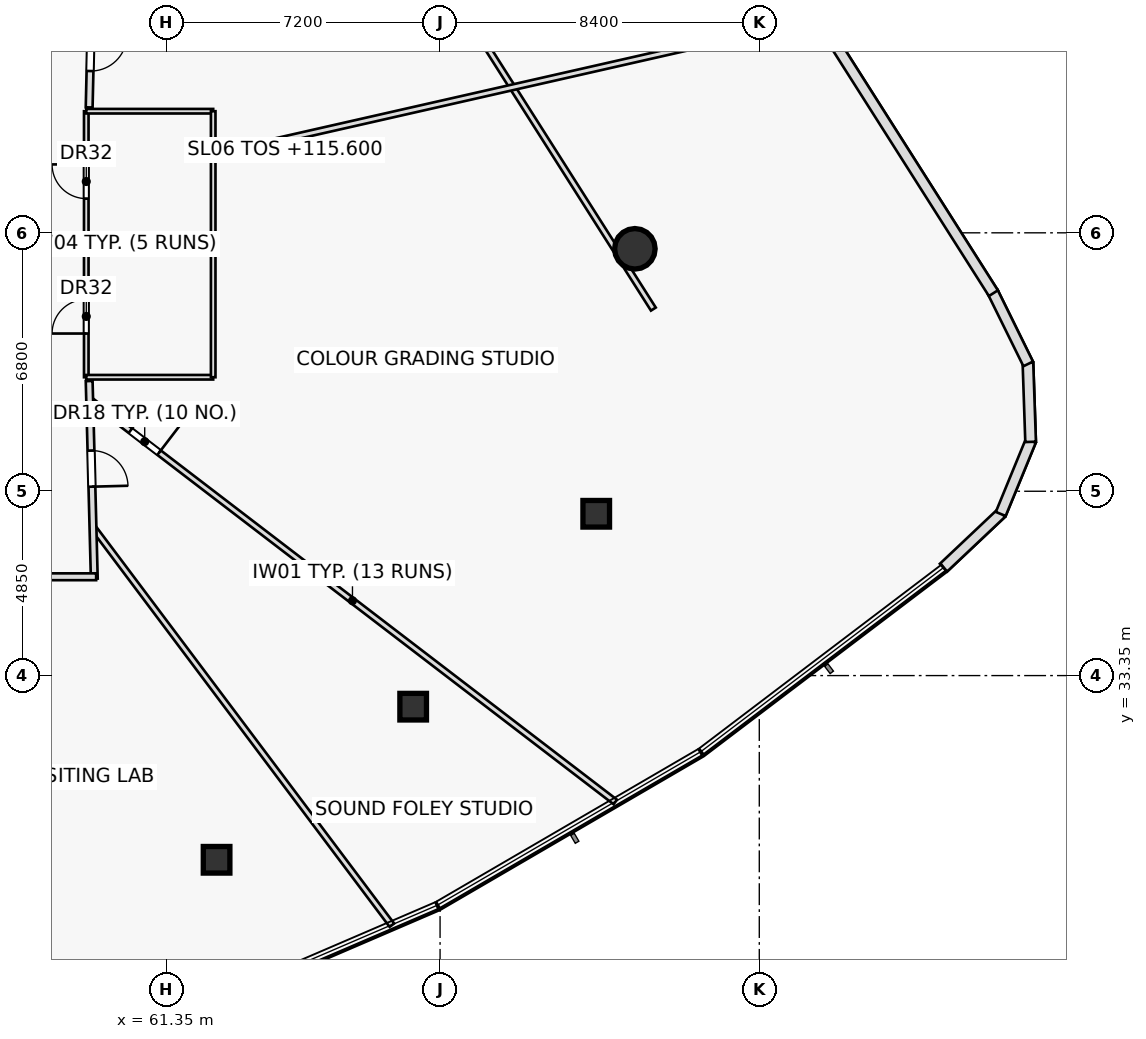
"""IFC4 building model, lengths in metres.
Left out: names, types, materials, properties, quantities, classifications, styles, units other than length and angle.
Written with IfcOpenShell. Run it as: python <this file> out.ifc"""

import sys

from ifc_helpers import new_model, si_unit, direction, frame, frame_2d, origin, origin_2d, place, context, subcontext, project, spatial, rectangle, hollow_rectangle, hollow_circle, extrude, element, fill, save


model = new_model("IFC4")
c1 = context("Model", 3, precision=1e-05, world=origin(), true_north=direction((0.0, 1.0)))
c2 = subcontext(c1, "Body", "Model", "MODEL_VIEW")
j1 = project(units=[si_unit("LENGTHUNIT", "METRE"), si_unit("PLANEANGLEUNIT", "RADIAN")], contexts=[c1])
p1 = place(None, origin())
s1 = spatial("IfcSite", under=j1, at=p1, CompositionType="ELEMENT")
p2 = place(p1, origin())
s2 = spatial("IfcBuilding", under=s1, at=p2, CompositionType="ELEMENT")
p3 = place(p2, frame((0.0, 0.0, 115.6)))
s3 = spatial("IfcBuildingStorey", under=s2, at=p3, CompositionType="ELEMENT", Elevation=115.6)
for number, where, z_axis, x_axis in (
    (1, (62.669, 28.503, 0.0), (0.0, 0.0, 1.0), (1.0, 0.0, 0.0)),
    (2, (67.842, 32.532, 0.0), (0.0, 0.0, 1.0), (1.0, 0.0, 0.0)),
    (3, (72.659, 37.607, 0.0), (0.0, 0.0, 1.0), (1.0, 0.0, 0.0)),
):
    element("IfcColumn", number, at=place(p3, frame(where, z_axis=z_axis, x_axis=x_axis)), inside=s3, PredefinedType="COLUMN", context=c2, shape_type="SweptSolid", body=[
        extrude(hollow_rectangle(XDim=0.7, YDim=0.7, WallThickness=0.04, at=origin_2d()), origin(), (0.0, 0.0, 1.0), 3.55),
    ])
p4 = place(p3, frame((73.676, 44.58, 0.0), z_axis=(0.0, 0.0, 1.0), x_axis=(1.0, 0.0, 0.0)))
e4 = element("IfcColumn", 4, at=p4, inside=s3, PredefinedType="COLUMN", context=c2, shape_type="SweptSolid", body=[
    extrude(hollow_circle(Radius=0.533, WallThickness=0.045, at=origin_2d()), origin(), (0.0, 0.0, 1.0), 3.55),
])
p5 = place(p3, frame((74.163, 42.993, 0.0), z_axis=(0.0, 0.0, 1.0), x_axis=(-0.53628142437, 0.844039237166, 0.0)))
e5 = element("IfcWall", 5, at=p5, inside=s3, PredefinedType="PARTITIONING", context=c2, shape_type="SweptSolid", body=[
    extrude(rectangle(XDim=10.267, YDim=0.15, at=frame_2d((5.133, 0.0))), origin(), (0.0, 0.0, 1.0), 2.835),
])
p6 = place(p3, frame((59.24, 41.2, 0.0), z_axis=(0.0, 0.0, 1.0), x_axis=(0.0, 1.0, 0.0)))
e6 = element("IfcWall", 6, at=p6, inside=s3, PredefinedType="PARTITIONING", context=c2, shape_type="SweptSolid", body=[
    extrude(rectangle(XDim=7.0, YDim=0.12, at=frame_2d((3.5, 0.0))), origin(), (0.0, 0.0, 1.0), 3.55),
])
p7 = place(p6, frame((1.15, 0.0, 0.0)))
e7 = element("IfcOpeningElement", 7, at=p7, cuts=e6, PredefinedType="OPENING", context=c2, shape_type="SweptSolid", body=[
    extrude(rectangle(XDim=0.9, YDim=2.05, at=frame_2d((0.45, 1.025))), frame((0.0, 0.07, 0.0), z_axis=(0.0, -1.0, 0.0), x_axis=(1.0, 0.0, 0.0)), (0.0, 0.0, 1.0), 0.14),
])
p8 = place(p6, frame((4.7, 0.0, 0.0)))
e8 = element("IfcOpeningElement", 8, at=p8, cuts=e6, PredefinedType="OPENING", context=c2, shape_type="SweptSolid", body=[
    extrude(rectangle(XDim=0.9, YDim=2.05, at=frame_2d((0.45, 1.025))), frame((0.0, 0.07, 0.0), z_axis=(0.0, -1.0, 0.0), x_axis=(1.0, 0.0, 0.0)), (0.0, 0.0, 1.0), 0.14),
])
for number, where, z_axis, x_axis in (
    (9, (59.24, 41.2, 0.0), (0.0, 0.0, 1.0), (1.0, 0.0, 0.0)),
    (10, (59.24, 44.65, 0.0), (0.0, 0.0, 1.0), (1.0, 0.0, 0.0)),
    (11, (59.24, 48.2, 0.0), (0.0, 0.0, 1.0), (1.0, 0.0, 0.0)),
):
    element("IfcWall", number, at=place(p3, frame(where, z_axis=z_axis, x_axis=x_axis)), inside=s3, PredefinedType="PARTITIONING", context=c2, shape_type="SweptSolid", body=[
        extrude(rectangle(XDim=3.34, YDim=0.12, at=frame_2d((1.67, 0.0))), origin(), (0.0, 0.0, 1.0), 3.55),
    ])
p9 = place(p3, frame((62.58, 41.2, 0.0), z_axis=(0.0, 0.0, 1.0), x_axis=(0.0, 1.0, 0.0)))
e12 = element("IfcWall", 12, at=p9, inside=s3, PredefinedType="PARTITIONING", context=c2, shape_type="SweptSolid", body=[
    extrude(rectangle(XDim=7.0, YDim=0.12, at=frame_2d((3.5, 0.0))), origin(), (0.0, 0.0, 1.0), 3.55),
])
p10 = place(p3, frame((59.416, 37.256, 0.0), z_axis=(0.0, 0.0, 1.0), x_axis=(0.60052474056, -0.799606175549, 0.0)))
e13 = element("IfcWall", 13, at=p10, inside=s3, PredefinedType="PARTITIONING", context=c2, shape_type="SweptSolid", body=[
    extrude(rectangle(XDim=13.098, YDim=0.15, at=frame_2d((6.549, 0.0))), origin(), (0.0, 0.0, 1.0), 2.835),
])
p11 = place(p3, frame((59.329, 40.614, 0.0), z_axis=(0.0, 0.0, 1.0), x_axis=(0.794014010307, -0.607899458329, 0.0)))
e14 = element("IfcWall", 14, at=p11, inside=s3, PredefinedType="PARTITIONING", context=c2, shape_type="SweptSolid", body=[
    extrude(rectangle(XDim=17.42, YDim=0.15, at=frame_2d((8.71, 0.0))), origin(), (0.0, 0.0, 1.0), 2.835),
])
p12 = place(p11, frame((1.35, 0.0, 0.0)))
e15 = element("IfcOpeningElement", 15, at=p12, cuts=e14, PredefinedType="OPENING", context=c2, shape_type="SweptSolid", body=[
    extrude(rectangle(XDim=0.95, YDim=2.05, at=frame_2d((0.475, 1.025))), frame((0.0, 0.085, 0.0), z_axis=(0.0, -1.0, 0.0), x_axis=(1.0, 0.0, 0.0)), (0.0, 0.0, 1.0), 0.17),
])
p13 = place(p3, frame((62.65, 47.055, 0.0), z_axis=(0.0, 0.0, 1.0), x_axis=(0.975173795811, 0.22144089045, 0.0)))
e16 = element("IfcWall", 16, at=p13, inside=s3, PredefinedType="PARTITIONING", context=c2, shape_type="SweptSolid", body=[
    extrude(rectangle(XDim=16.337, YDim=0.15, at=frame_2d((8.168, 0.0))), origin(), (0.0, 0.0, 1.0), 2.975),
])
p14 = place(p3, frame((59.451, 54.1, 0.0), z_axis=(0.0, 0.0, 1.0), x_axis=(-0.023271046154, -0.999729192537, 0.0)))
e17 = element("IfcWall", 17, at=p14, inside=s3, PredefinedType="PARTITIONING", context=c2, shape_type="SweptSolid", body=[
    extrude(rectangle(XDim=5.802, YDim=0.18, at=frame_2d((2.901, 0.0))), origin(), (0.0, 0.0, 1.0), 2.835),
])
p15 = place(p14, frame((1.208, 0.0, 0.0)))
e18 = element("IfcOpeningElement", 18, at=p15, cuts=e17, PredefinedType="OPENING", context=c2, shape_type="SweptSolid", body=[
    extrude(rectangle(XDim=0.95, YDim=2.05, at=frame_2d((0.475, 1.025))), frame((0.0, 0.1, 0.0), z_axis=(0.0, -1.0, 0.0), x_axis=(1.0, 0.0, 0.0)), (0.0, 0.0, 1.0), 0.2),
])
p16 = place(p14, frame((3.894, 0.0, 0.0)))
e19 = element("IfcOpeningElement", 19, at=p16, cuts=e17, PredefinedType="OPENING", context=c2, shape_type="SweptSolid", body=[
    extrude(rectangle(XDim=0.95, YDim=2.05, at=frame_2d((0.475, 1.025))), frame((0.0, 0.1, 0.0), z_axis=(0.0, -1.0, 0.0), x_axis=(1.0, 0.0, 0.0)), (0.0, 0.0, 1.0), 0.2),
])
p17 = place(p3, frame((59.316, 41.1, 0.0), z_axis=(0.0, 0.0, 1.0), x_axis=(0.025953695765, -0.999663146103, 0.0)))
e20 = element("IfcWall", 20, at=p17, inside=s3, PredefinedType="PARTITIONING", context=c2, shape_type="SweptSolid", body=[
    extrude(rectangle(XDim=5.202, YDim=0.18, at=frame_2d((2.601, 0.0))), origin(), (0.0, 0.0, 1.0), 2.835),
])
p18 = place(p17, frame((1.831, 0.0, 0.0)))
e21 = element("IfcOpeningElement", 21, at=p18, cuts=e20, PredefinedType="OPENING", context=c2, shape_type="SweptSolid", body=[
    extrude(rectangle(XDim=0.95, YDim=2.05, at=frame_2d((0.475, 1.025))), frame((0.0, 0.1, 0.0), z_axis=(0.0, -1.0, 0.0), x_axis=(1.0, 0.0, 0.0)), (0.0, 0.0, 1.0), 0.2),
])
p19 = place(p3, frame((59.5, 35.95, 0.0), z_axis=(0.0, 0.0, 1.0), x_axis=(-1.0, 0.0, 0.0)))
e22 = element("IfcWall", 22, at=p19, inside=s3, PredefinedType="PARTITIONING", context=c2, shape_type="SweptSolid", body=[
    extrude(rectangle(XDim=19.0, YDim=0.18, at=frame_2d((9.5, 0.0))), origin(), (0.0, 0.0, 1.0), 2.835),
])
p20 = place(p19, frame((3.155, 0.0, 0.0)))
e23 = element("IfcOpeningElement", 23, at=p20, cuts=e22, PredefinedType="OPENING", context=c2, shape_type="SweptSolid", body=[
    extrude(rectangle(XDim=0.95, YDim=2.05, at=frame_2d((0.475, 1.025))), frame((0.0, 0.1, 0.0), z_axis=(0.0, -1.0, 0.0), x_axis=(1.0, 0.0, 0.0)), (0.0, 0.0, 1.0), 0.2),
])
p21 = place(p19, frame((7.897, 0.0, 0.0)))
e24 = element("IfcOpeningElement", 24, at=p21, cuts=e22, PredefinedType="OPENING", context=c2, shape_type="SweptSolid", body=[
    extrude(rectangle(XDim=0.95, YDim=2.05, at=frame_2d((0.475, 1.025))), frame((0.0, 0.1, 0.0), z_axis=(0.0, -1.0, 0.0), x_axis=(1.0, 0.0, 0.0)), (0.0, 0.0, 1.0), 0.2),
])
p22 = place(p19, frame((13.774, 0.0, 0.0)))
e25 = element("IfcOpeningElement", 25, at=p22, cuts=e22, PredefinedType="OPENING", context=c2, shape_type="SweptSolid", body=[
    extrude(rectangle(XDim=0.95, YDim=2.05, at=frame_2d((0.475, 1.025))), frame((0.0, 0.1, 0.0), z_axis=(0.0, -1.0, 0.0), x_axis=(1.0, 0.0, 0.0)), (0.0, 0.0, 1.0), 0.2),
])
p23 = place(p3, frame((81.798, 36.19, 0.0), z_axis=(0.0, 0.0, 1.0), x_axis=(0.727110183579, 0.686520779683, 0.0)))
e26 = element("IfcWall", 26, at=p23, inside=s3, PredefinedType="STANDARD", context=c2, shape_type="SweptSolid", body=[
    extrude(rectangle(XDim=2.093, YDim=0.28, at=frame_2d((1.047, 0.0))), origin(), (0.0, 0.0, 1.0), 3.55),
])
p24 = place(p3, frame((83.303, 37.603, 0.0), z_axis=(0.0, 0.0, 1.0), x_axis=(0.38023064768, 0.92489169883, 0.0)))
e27 = element("IfcWall", 27, at=p24, inside=s3, PredefinedType="STANDARD", context=c2, shape_type="SweptSolid", body=[
    extrude(rectangle(XDim=2.082, YDim=0.28, at=frame_2d((1.041, 0.0))), origin(), (0.0, 0.0, 1.0), 3.55),
])
p25 = place(p3, frame((84.09, 39.499, 0.0), z_axis=(0.0, 0.0, 1.0), x_axis=(-0.034017858603, 0.999421225158, 0.0)))
e28 = element("IfcWall", 28, at=p25, inside=s3, PredefinedType="STANDARD", context=c2, shape_type="SweptSolid", body=[
    extrude(rectangle(XDim=2.081, YDim=0.28, at=frame_2d((1.041, 0.0))), origin(), (0.0, 0.0, 1.0), 3.55),
])
p26 = place(p3, frame((84.026, 41.551, 0.0), z_axis=(0.0, 0.0, 1.0), x_axis=(-0.442240058181, 0.896896722561, 0.0)))
e29 = element("IfcWall", 29, at=p26, inside=s3, PredefinedType="STANDARD", context=c2, shape_type="SweptSolid", body=[
    extrude(rectangle(XDim=2.104, YDim=0.28, at=frame_2d((1.052, 0.0))), origin(), (0.0, 0.0, 1.0), 3.55),
])
p27 = place(p3, frame((83.11, 43.412, 0.0), z_axis=(0.0, 0.0, 1.0), x_axis=(-0.536180294115, 0.844103484297, 0.0)))
e30 = element("IfcWall", 30, at=p27, inside=s3, PredefinedType="STANDARD", context=c2, shape_type="SweptSolid", body=[
    extrude(rectangle(XDim=8.069, YDim=0.28, at=frame_2d((4.034, 0.0))), origin(), (0.0, 0.0, 1.0), 3.55),
])
p28 = place(p7, origin())
e31 = element("IfcDoor", 31, at=p28, inside=s3, OperationType="SINGLE_SWING_LEFT", PredefinedType="DOOR", context=c2, shape_type="SweptSolid", body=[
    extrude(rectangle(XDim=0.9, YDim=2.05, at=frame_2d((0.45, 1.025))), frame((0.0, 0.025, 0.0), z_axis=(0.0, -1.0, 0.0), x_axis=(1.0, 0.0, 0.0)), (0.0, 0.0, 1.0), 0.05),
])
fill(e7, e31)
p29 = place(p8, origin())
e32 = element("IfcDoor", 32, at=p29, inside=s3, OperationType="SINGLE_SWING_RIGHT", PredefinedType="DOOR", context=c2, shape_type="SweptSolid", body=[
    extrude(rectangle(XDim=0.9, YDim=2.05, at=frame_2d((0.45, 1.025))), frame((0.0, 0.025, 0.0), z_axis=(0.0, -1.0, 0.0), x_axis=(1.0, 0.0, 0.0)), (0.0, 0.0, 1.0), 0.05),
])
fill(e8, e32)
p30 = place(p12, origin())
e33 = element("IfcDoor", 33, at=p30, inside=s3, OperationType="SINGLE_SWING_RIGHT", PredefinedType="DOOR", context=c2, shape_type="SweptSolid", body=[
    extrude(rectangle(XDim=0.95, YDim=2.05, at=frame_2d((0.475, 1.025))), frame((0.0, 0.025, 0.0), z_axis=(0.0, -1.0, 0.0), x_axis=(1.0, 0.0, 0.0)), (0.0, 0.0, 1.0), 0.05),
])
fill(e15, e33)
p31 = place(p16, origin())
e34 = element("IfcDoor", 34, at=p31, inside=s3, OperationType="SINGLE_SWING_LEFT", PredefinedType="DOOR", context=c2, shape_type="SweptSolid", body=[
    extrude(rectangle(XDim=0.95, YDim=2.05, at=frame_2d((0.475, 1.025))), frame((0.0, 0.025, 0.0), z_axis=(0.0, -1.0, 0.0), x_axis=(1.0, 0.0, 0.0)), (0.0, 0.0, 1.0), 0.05),
])
fill(e19, e34)
p32 = place(p18, origin())
e35 = element("IfcDoor", 35, at=p32, inside=s3, OperationType="SINGLE_SWING_RIGHT", PredefinedType="DOOR", context=c2, shape_type="SweptSolid", body=[
    extrude(rectangle(XDim=0.95, YDim=2.05, at=frame_2d((0.475, 1.025))), frame((0.0, 0.025, 0.0), z_axis=(0.0, -1.0, 0.0), x_axis=(1.0, 0.0, 0.0)), (0.0, 0.0, 1.0), 0.05),
])
fill(e21, e35)
save(model, sys.argv[1])
